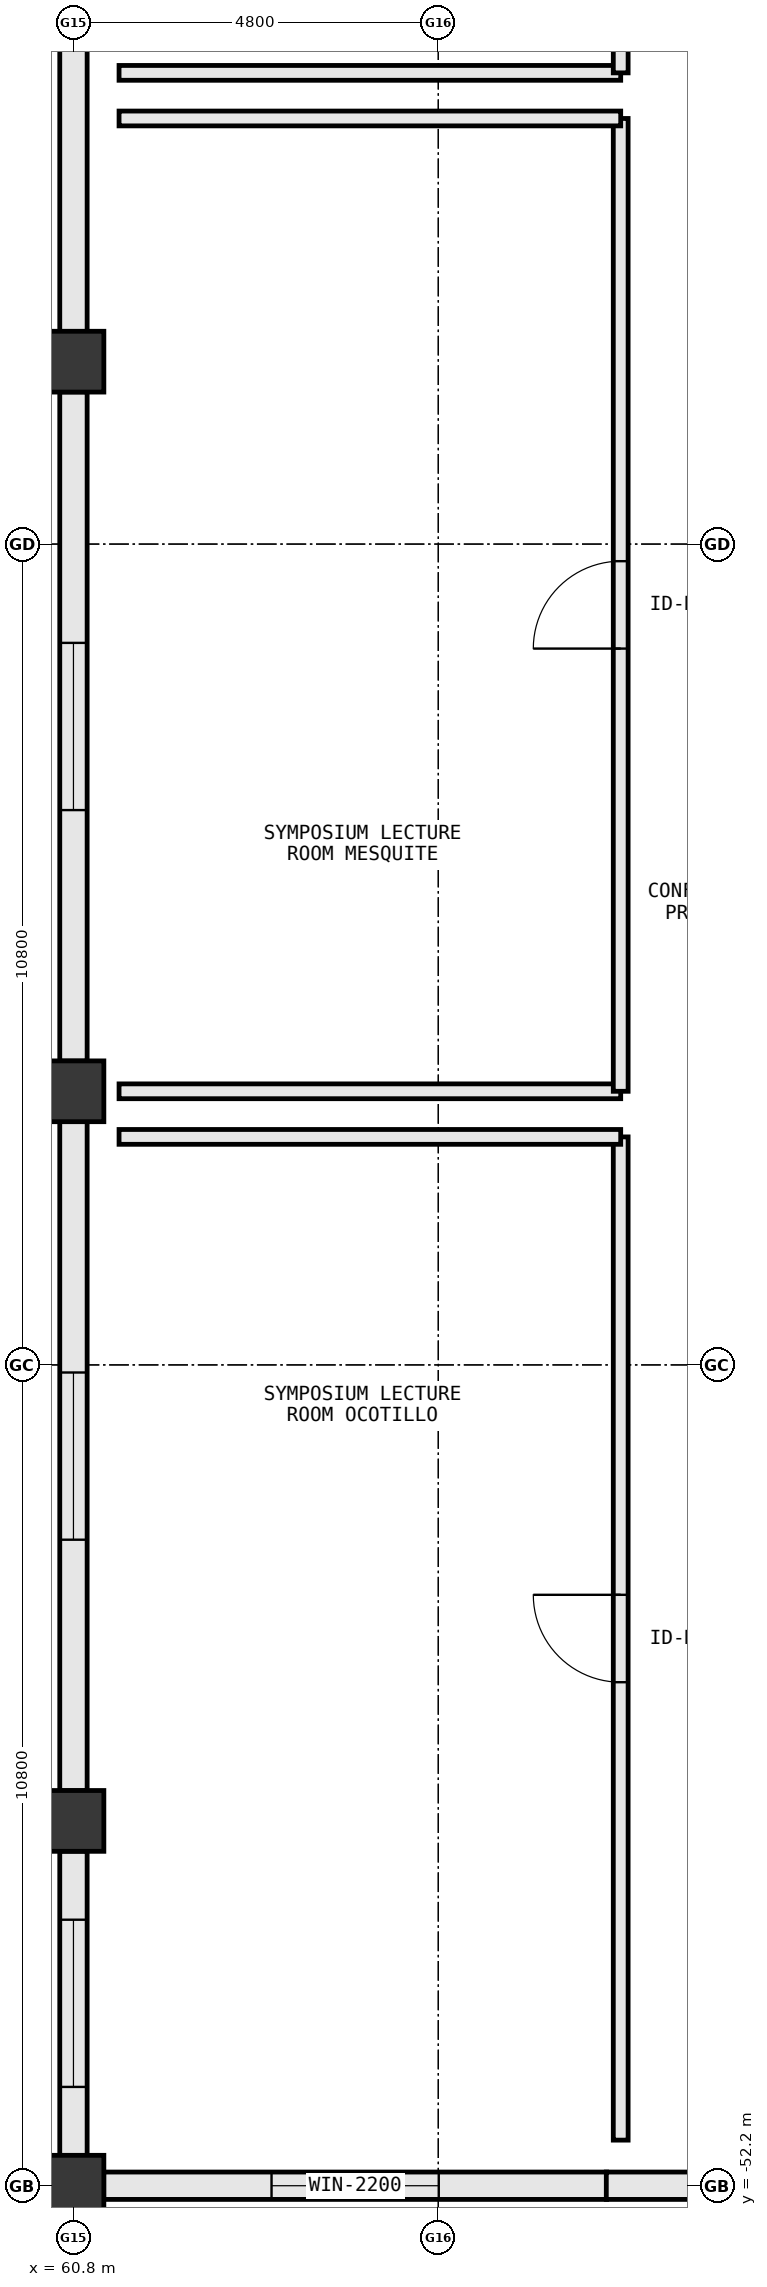
"""IFC4 building model, lengths in metres.
Left out: names, types, materials, properties, quantities, classifications, styles, units other than length and angle.
Written with IfcOpenShell. Run it as: python <this file> out.ifc"""

import sys

from ifc_helpers import new_model, si_unit, direction, frame, frame_2d, origin, origin_2d, place, context, subcontext, project, spatial, rectangle, extrude, element, fill, save


model = new_model("IFC4")
c1 = context("Model", 3, precision=1e-05, world=origin(), true_north=direction((0.0, 1.0)))
c2 = subcontext(c1, "Body", "Model", "MODEL_VIEW")
j1 = project(units=[si_unit("LENGTHUNIT", "METRE"), si_unit("PLANEANGLEUNIT", "RADIAN")], contexts=[c1])
p1 = place(None, origin())
s1 = spatial("IfcSite", under=j1, at=p1, CompositionType="ELEMENT")
p2 = place(p1, origin())
s2 = spatial("IfcBuilding", under=s1, at=p2, CompositionType="ELEMENT")
p3 = place(p2, frame((0.0, 0.0, 5.4)))
s3 = spatial("IfcBuildingStorey", under=s2, at=p3, CompositionType="ELEMENT", Elevation=5.4)
for number, where, z_axis, x_axis in (
    (1, (60.8, -52.2, 0.0), (0.0, 0.0, 1.0), (1.0, 0.0, 0.0)),
    (2, (60.8, -47.4, 0.0), (0.0, 0.0, 1.0), (1.0, 0.0, 0.0)),
    (3, (60.8, -37.8, 0.0), (0.0, 0.0, 1.0), (1.0, 0.0, 0.0)),
    (4, (60.8, -28.2, 0.0), (0.0, 0.0, 1.0), (1.0, 0.0, 0.0)),
):
    element("IfcColumn", number, at=place(p3, frame(where, z_axis=z_axis, x_axis=x_axis)), inside=s3, PredefinedType="COLUMN", context=c2, shape_type="SweptSolid", body=[
        extrude(rectangle(XDim=0.8, YDim=0.8, at=origin_2d()), origin(), (0.0, 0.0, 1.0), 5.4),
    ])
p4 = place(p3, frame((61.198, -52.2, 0.0), z_axis=(0.0, 0.0, 1.0), x_axis=(1.0, 0.0, 0.0)))
e5 = element("IfcWall", 5, at=p4, inside=s3, PredefinedType="STANDARD", context=c2, shape_type="SweptSolid", body=[
    extrude(rectangle(XDim=6.616, YDim=0.36, at=frame_2d((3.308, 0.0))), origin(), (0.0, 0.0, 1.0), 4.513),
])
p5 = place(p4, frame((2.208, 0.0, 0.85)))
e6 = element("IfcOpeningElement", 6, at=p5, cuts=e5, PredefinedType="OPENING", context=c2, shape_type="SweptSolid", body=[
    extrude(rectangle(XDim=2.2, YDim=2.0, at=frame_2d((1.1, 1.0))), frame((0.0, 0.192, 0.0), z_axis=(0.0, -1.0, 0.0), x_axis=(1.0, 0.0, 0.0)), (0.0, 0.0, 1.0), 0.384),
])
p6 = place(p3, frame((67.811, -52.2, 0.0), z_axis=(0.0, 0.0, 1.0), x_axis=(1.0, 0.0, 0.0)))
e7 = element("IfcWall", 7, at=p6, inside=s3, PredefinedType="STANDARD", context=c2, shape_type="SweptSolid", body=[
    extrude(rectangle(XDim=6.616, YDim=0.36, at=frame_2d((3.308, 0.0))), origin(), (0.0, 0.0, 1.0), 4.513),
])
p7 = place(p3, frame((60.8, -23.798, 0.0), z_axis=(0.0, 0.0, 1.0), x_axis=(0.0, -1.0, 0.0)))
e8 = element("IfcWall", 8, at=p7, inside=s3, PredefinedType="STANDARD", context=c2, shape_type="SweptSolid", body=[
    extrude(rectangle(XDim=4.004, YDim=0.36, at=frame_2d((2.002, 0.0))), origin(), (0.0, 0.0, 1.0), 4.585),
])
p8 = place(p3, frame((60.8, -28.598, 0.0), z_axis=(0.0, 0.0, 1.0), x_axis=(0.0, -1.0, 0.0)))
e9 = element("IfcWall", 9, at=p8, inside=s3, PredefinedType="STANDARD", context=c2, shape_type="SweptSolid", body=[
    extrude(rectangle(XDim=8.804, YDim=0.36, at=frame_2d((4.402, 0.0))), origin(), (0.0, 0.0, 1.0), 4.485),
])
p9 = place(p8, frame((3.302, 0.0, 0.85)))
e10 = element("IfcOpeningElement", 10, at=p9, cuts=e9, PredefinedType="OPENING", context=c2, shape_type="SweptSolid", body=[
    extrude(rectangle(XDim=2.2, YDim=2.0, at=frame_2d((1.1, 1.0))), frame((0.0, 0.192, 0.0), z_axis=(0.0, -1.0, 0.0), x_axis=(1.0, 0.0, 0.0)), (0.0, 0.0, 1.0), 0.384),
])
p10 = place(p3, frame((60.8, -38.198, 0.0), z_axis=(0.0, 0.0, 1.0), x_axis=(0.0, -1.0, 0.0)))
e11 = element("IfcWall", 11, at=p10, inside=s3, PredefinedType="STANDARD", context=c2, shape_type="SweptSolid", body=[
    extrude(rectangle(XDim=8.804, YDim=0.36, at=frame_2d((4.402, 0.0))), origin(), (0.0, 0.0, 1.0), 4.485),
])
p11 = place(p10, frame((3.302, 0.0, 0.85)))
e12 = element("IfcOpeningElement", 12, at=p11, cuts=e11, PredefinedType="OPENING", context=c2, shape_type="SweptSolid", body=[
    extrude(rectangle(XDim=2.2, YDim=2.0, at=frame_2d((1.1, 1.0))), frame((0.0, 0.192, 0.0), z_axis=(0.0, -1.0, 0.0), x_axis=(1.0, 0.0, 0.0)), (0.0, 0.0, 1.0), 0.384),
])
p12 = place(p3, frame((60.8, -47.798, 0.0), z_axis=(0.0, 0.0, 1.0), x_axis=(0.0, -1.0, 0.0)))
e13 = element("IfcWall", 13, at=p12, inside=s3, PredefinedType="STANDARD", context=c2, shape_type="SweptSolid", body=[
    extrude(rectangle(XDim=4.004, YDim=0.36, at=frame_2d((2.002, 0.0))), origin(), (0.0, 0.0, 1.0), 4.585),
])
p13 = place(p12, frame((0.902, 0.0, 0.85)))
e14 = element("IfcOpeningElement", 14, at=p13, cuts=e13, PredefinedType="OPENING", context=c2, shape_type="SweptSolid", body=[
    extrude(rectangle(XDim=2.2, YDim=2.0, at=frame_2d((1.1, 1.0))), frame((0.0, 0.192, 0.0), z_axis=(0.0, -1.0, 0.0), x_axis=(1.0, 0.0, 0.0)), (0.0, 0.0, 1.0), 0.384),
])
p14 = place(p3, frame((68.0, -51.6, 0.0), z_axis=(0.0, 0.0, 1.0), x_axis=(0.0, 1.0, 0.0)))
e15 = element("IfcWall", 15, at=p14, inside=s3, PredefinedType="PARTITIONING", context=c2, shape_type="SweptSolid", body=[
    extrude(rectangle(XDim=13.2, YDim=0.195, at=frame_2d((6.6, 0.0))), origin(), (0.0, 0.0, 1.0), 5.13),
])
p15 = place(p14, frame((6.025, 0.0, 0.0)))
e16 = element("IfcOpeningElement", 16, at=p15, cuts=e15, PredefinedType="OPENING", context=c2, shape_type="SweptSolid", body=[
    extrude(rectangle(XDim=1.15, YDim=2.2, at=frame_2d((0.575, 1.1))), frame((0.0, 0.11, 0.0), z_axis=(0.0, -1.0, 0.0), x_axis=(1.0, 0.0, 0.0)), (0.0, 0.0, 1.0), 0.219),
])
p16 = place(p3, frame((68.0, -38.4, 0.0), z_axis=(0.0, 0.0, 1.0), x_axis=(-1.0, 0.0, 0.0)))
e17 = element("IfcWall", 17, at=p16, inside=s3, PredefinedType="PARTITIONING", context=c2, shape_type="SweptSolid", body=[
    extrude(rectangle(XDim=6.6, YDim=0.195, at=frame_2d((3.3, 0.0))), origin(), (0.0, 0.0, 1.0), 5.13),
])
p17 = place(p3, frame((61.4, -37.8, 0.0), z_axis=(0.0, 0.0, 1.0), x_axis=(1.0, 0.0, 0.0)))
e18 = element("IfcWall", 18, at=p17, inside=s3, PredefinedType="PARTITIONING", context=c2, shape_type="SweptSolid", body=[
    extrude(rectangle(XDim=6.6, YDim=0.195, at=frame_2d((3.3, 0.0))), origin(), (0.0, 0.0, 1.0), 4.405),
])
p18 = place(p3, frame((68.0, -37.8, 0.0), z_axis=(0.0, 0.0, 1.0), x_axis=(0.0, 1.0, 0.0)))
e19 = element("IfcWall", 19, at=p18, inside=s3, PredefinedType="PARTITIONING", context=c2, shape_type="SweptSolid", body=[
    extrude(rectangle(XDim=12.8, YDim=0.195, at=frame_2d((6.4, 0.0))), origin(), (0.0, 0.0, 1.0), 5.13),
])
p19 = place(p18, frame((5.825, 0.0, 0.0)))
e20 = element("IfcOpeningElement", 20, at=p19, cuts=e19, PredefinedType="OPENING", context=c2, shape_type="SweptSolid", body=[
    extrude(rectangle(XDim=1.15, YDim=2.2, at=frame_2d((0.575, 1.1))), frame((0.0, 0.11, 0.0), z_axis=(0.0, -1.0, 0.0), x_axis=(1.0, 0.0, 0.0)), (0.0, 0.0, 1.0), 0.219),
])
for number, where, z_axis, x_axis in (
    (21, (68.0, -25.0, 0.0), (0.0, 0.0, 1.0), (-1.0, 0.0, 0.0)),
    (22, (61.4, -24.4, 0.0), (0.0, 0.0, 1.0), (1.0, 0.0, 0.0)),
):
    element("IfcWall", number, at=place(p3, frame(where, z_axis=z_axis, x_axis=x_axis)), inside=s3, PredefinedType="PARTITIONING", context=c2, shape_type="SweptSolid", body=[
        extrude(rectangle(XDim=6.6, YDim=0.195, at=frame_2d((3.3, 0.0))), origin(), (0.0, 0.0, 1.0), 5.13),
    ])
p20 = place(p3, frame((68.0, -24.4, 0.0), z_axis=(0.0, 0.0, 1.0), x_axis=(0.0, 1.0, 0.0)))
e23 = element("IfcWall", 23, at=p20, inside=s3, PredefinedType="PARTITIONING", context=c2, shape_type="SweptSolid", body=[
    extrude(rectangle(XDim=12.4, YDim=0.195, at=frame_2d((6.2, 0.0))), origin(), (0.0, 0.0, 1.0), 5.13),
])
p21 = place(p20, frame((5.625, 0.0, 0.0)))
e24 = element("IfcOpeningElement", 24, at=p21, cuts=e23, PredefinedType="OPENING", context=c2, shape_type="SweptSolid", body=[
    extrude(rectangle(XDim=1.15, YDim=2.2, at=frame_2d((0.575, 1.1))), frame((0.0, 0.11, 0.0), z_axis=(0.0, -1.0, 0.0), x_axis=(1.0, 0.0, 0.0)), (0.0, 0.0, 1.0), 0.219),
])
p22 = place(p5, origin())
e25 = element("IfcWindow", 25, at=p22, inside=s3, PartitioningType="DOUBLE_PANEL_VERTICAL", PredefinedType="WINDOW", context=c2, shape_type="SweptSolid", body=[
    extrude(rectangle(XDim=2.2, YDim=2.0, at=frame_2d((1.1, 1.0))), frame((0.0, 0.03, 0.0), z_axis=(0.0, -1.0, 0.0), x_axis=(1.0, 0.0, 0.0)), (0.0, 0.0, 1.0), 0.06),
])
fill(e6, e25)
p23 = place(p9, origin())
e26 = element("IfcWindow", 26, at=p23, inside=s3, PartitioningType="DOUBLE_PANEL_VERTICAL", PredefinedType="WINDOW", context=c2, shape_type="SweptSolid", body=[
    extrude(rectangle(XDim=2.2, YDim=2.0, at=frame_2d((1.1, 1.0))), frame((0.0, 0.03, 0.0), z_axis=(0.0, -1.0, 0.0), x_axis=(1.0, 0.0, 0.0)), (0.0, 0.0, 1.0), 0.06),
])
fill(e10, e26)
p24 = place(p11, origin())
e27 = element("IfcWindow", 27, at=p24, inside=s3, PartitioningType="DOUBLE_PANEL_VERTICAL", PredefinedType="WINDOW", context=c2, shape_type="SweptSolid", body=[
    extrude(rectangle(XDim=2.2, YDim=2.0, at=frame_2d((1.1, 1.0))), frame((0.0, 0.03, 0.0), z_axis=(0.0, -1.0, 0.0), x_axis=(1.0, 0.0, 0.0)), (0.0, 0.0, 1.0), 0.06),
])
fill(e12, e27)
p25 = place(p13, origin())
e28 = element("IfcWindow", 28, at=p25, inside=s3, PartitioningType="DOUBLE_PANEL_VERTICAL", PredefinedType="WINDOW", context=c2, shape_type="SweptSolid", body=[
    extrude(rectangle(XDim=2.2, YDim=2.0, at=frame_2d((1.1, 1.0))), frame((0.0, 0.03, 0.0), z_axis=(0.0, -1.0, 0.0), x_axis=(1.0, 0.0, 0.0)), (0.0, 0.0, 1.0), 0.06),
])
fill(e14, e28)
p26 = place(p15, origin())
e29 = element("IfcDoor", 29, at=p26, inside=s3, OperationType="SINGLE_SWING_RIGHT", PredefinedType="DOOR", context=c2, shape_type="SweptSolid", body=[
    extrude(rectangle(XDim=1.15, YDim=2.2, at=frame_2d((0.575, 1.1))), frame((0.0, 0.025, 0.0), z_axis=(0.0, -1.0, 0.0), x_axis=(1.0, 0.0, 0.0)), (0.0, 0.0, 1.0), 0.05),
])
fill(e16, e29)
p27 = place(p19, origin())
e30 = element("IfcDoor", 30, at=p27, inside=s3, OperationType="SINGLE_SWING_LEFT", PredefinedType="DOOR", context=c2, shape_type="SweptSolid", body=[
    extrude(rectangle(XDim=1.15, YDim=2.2, at=frame_2d((0.575, 1.1))), frame((0.0, 0.025, 0.0), z_axis=(0.0, -1.0, 0.0), x_axis=(1.0, 0.0, 0.0)), (0.0, 0.0, 1.0), 0.05),
])
fill(e20, e30)
save(model, sys.argv[1])
